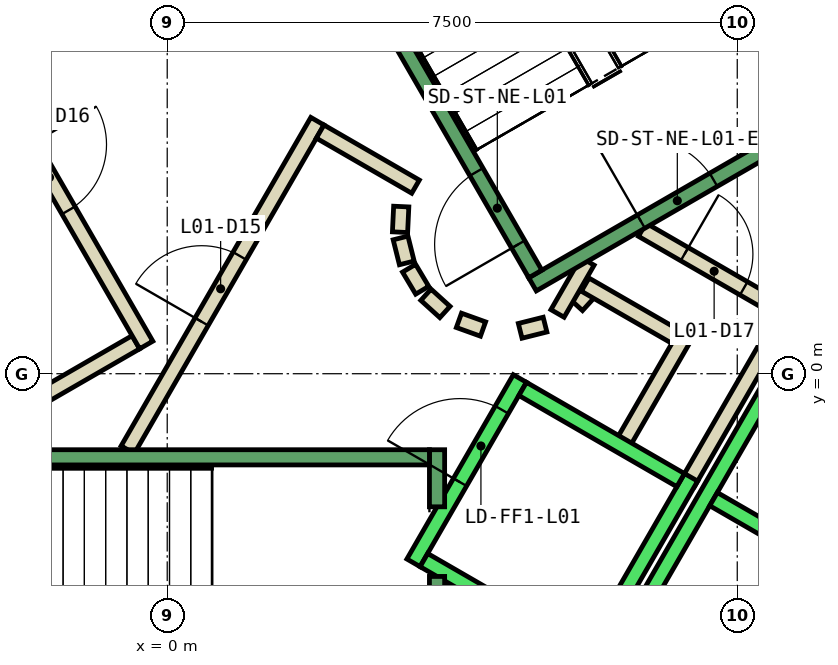
"""IFC4 building model, lengths in metres.
Left out: names, types, materials, properties, quantities, classifications, styles, units other than length and angle.
Written with IfcOpenShell. Run it as: python <this file> out.ifc"""

import sys

from ifc_helpers import new_model, si_unit, direction, frame, frame_2d, origin, place, context, subcontext, project, spatial, polyline, rectangle, outline, extrude, element, fill, save


model = new_model("IFC4")
c1 = context("Model", 3, precision=1e-05, world=origin(), true_north=direction((0.0, 1.0)))
c2 = subcontext(c1, "Body", "Model", "MODEL_VIEW")
j1 = project(units=[si_unit("LENGTHUNIT", "METRE"), si_unit("PLANEANGLEUNIT", "RADIAN")], contexts=[c1])
p1 = place(None, origin())
s1 = spatial("IfcSite", under=j1, at=p1, CompositionType="ELEMENT")
p2 = place(p1, origin())
s2 = spatial("IfcBuilding", under=s1, at=p2, CompositionType="ELEMENT")
p3 = place(p2, frame((0.0, 0.0, 9.0)))
s3 = spatial("IfcBuildingStorey", under=s2, at=p3, CompositionType="ELEMENT", Elevation=9.0)
p4 = place(p3, frame((0.0, 0.0, -0.45)))
e1 = element("IfcWall", 1, at=p4, inside=s3, PredefinedType="SHEAR", context=c2, shape_type="SweptSolid", body=[
    extrude(outline(polyline([(8.517, 11.748), (7.651, 11.248), (12.702, 2.5), (13.856, 2.5), (8.517, 11.748)])), origin(), (0.0, 0.0, 1.0), 6.0),
])
p5 = place(p3, frame((5.39, 0.898, 0.0), z_axis=(0.0, 0.0, 1.0), x_axis=(0.673828488714, 0.738887791073, 0.0)))
e2 = element("IfcWall", 2, at=p5, inside=s3, PredefinedType="PARTITIONING", context=c2, shape_type="SweptSolid", body=[
    extrude(rectangle(XDim=0.263, YDim=0.2, at=frame_2d((0.131, 0.0))), origin(), (0.0, 0.0, 1.0), 5.55),
])
p6 = place(p3, frame((5.499, 1.172, 0.0), z_axis=(0.0, 0.0, 1.0), x_axis=(0.866333505267, -0.499465972466, 0.0)))
e3 = element("IfcWall", 3, at=p6, inside=s3, PredefinedType="PARTITIONING", context=c2, shape_type="SweptSolid", body=[
    extrude(rectangle(XDim=1.374, YDim=0.2, at=frame_2d((0.687, 0.0))), origin(), (0.0, 0.0, 1.0), 5.55),
])
p7 = place(p3, frame((6.826, 0.522, 0.0), z_axis=(0.0, 0.0, 1.0), x_axis=(-0.500016722714, -0.866015748706, 0.0)))
e4 = element("IfcWall", 4, at=p7, inside=s3, PredefinedType="PARTITIONING", context=c2, shape_type="SweptSolid", body=[
    extrude(rectangle(XDim=1.7, YDim=0.2, at=frame_2d((0.85, 0.0))), origin(), (0.0, 0.0, 1.0), 5.55),
])
p8 = place(p3, frame((8.192, 0.888, 0.0), z_axis=(0.0, 0.0, 1.0), x_axis=(-0.499940625693, -0.866059680843, 0.0)))
e5 = element("IfcWall", 5, at=p8, inside=s3, PredefinedType="PARTITIONING", context=c2, shape_type="SweptSolid", body=[
    extrude(rectangle(XDim=2.68, YDim=0.2, at=frame_2d((1.34, 0.0))), origin(), (0.0, 0.0, 1.0), 5.55),
])
p9 = place(p3, frame((5.135, 0.793, 0.0), z_axis=(0.0, 0.0, 1.0), x_axis=(0.499526442893, 0.866298639529, 0.0)))
e6 = element("IfcWall", 6, at=p9, inside=s3, PredefinedType="PARTITIONING", context=c2, shape_type="SweptSolid", body=[
    extrude(rectangle(XDim=0.791, YDim=0.2, at=frame_2d((0.396, 0.0))), origin(), (0.0, 0.0, 1.0), 5.55),
])
p10 = place(p3, frame((6.25, 1.894, 0.0), z_axis=(0.0, 0.0, 1.0), x_axis=(0.866043184279, -0.499969202016, 0.0)))
e7 = element("IfcWall", 7, at=p10, inside=s3, PredefinedType="PARTITIONING", context=c2, shape_type="SweptSolid", body=[
    extrude(rectangle(XDim=2.084, YDim=0.2, at=frame_2d((1.042, 0.0))), origin(), (0.0, 0.0, 1.0), 5.55),
])
p11 = place(p10, frame((0.642, 0.0, 0.0)))
e8 = element("IfcOpeningElement", 8, at=p11, cuts=e7, PredefinedType="OPENING", context=c2, shape_type="SweptSolid", body=[
    extrude(rectangle(XDim=0.9, YDim=2.1, at=frame_2d((0.45, 1.05))), frame((0.0, 0.11, 0.0), z_axis=(0.0, -1.0, 0.0), x_axis=(1.0, 0.0, 0.0)), (0.0, 0.0, 1.0), 0.22),
])
p12 = place(p3, frame((3.079, 2.199, 0.0), z_axis=(0.0, 0.0, 1.0), x_axis=(-0.047771483479, -0.998858290933, 0.0)))
e9 = element("IfcWall", 9, at=p12, inside=s3, PredefinedType="PARTITIONING", context=c2, shape_type="SweptSolid", body=[
    extrude(rectangle(XDim=0.337, YDim=0.2, at=frame_2d((0.169, 0.0))), origin(), (0.0, 0.0, 1.0), 5.55),
])
p13 = place(p3, frame((3.07, 1.786, 0.0), z_axis=(0.0, 0.0, 1.0), x_axis=(0.242705583207, -0.970099994784, 0.0)))
e10 = element("IfcWall", 10, at=p13, inside=s3, PredefinedType="PARTITIONING", context=c2, shape_type="SweptSolid", body=[
    extrude(rectangle(XDim=0.338, YDim=0.2, at=frame_2d((0.169, 0.0))), origin(), (0.0, 0.0, 1.0), 5.55),
])
for number, where, z_axis, x_axis in (
    (11, (3.182, 1.388, 0.0), (0.0, 0.0, 1.0), (0.512, -0.859, 0.0)),
    (12, (3.404, 1.039, 0.0), (0.0, 0.0, 1.0), (0.74, -0.672, 0.0)),
):
    element("IfcWall", number, at=place(p3, frame(where, z_axis=z_axis, x_axis=x_axis)), inside=s3, PredefinedType="PARTITIONING", context=c2, shape_type="SweptSolid", body=[
        extrude(rectangle(XDim=0.338, YDim=0.2, at=frame_2d((0.169, 0.0))), origin(), (0.0, 0.0, 1.0), 5.55),
    ])
p14 = place(p3, frame((3.838, 0.702, 0.0), z_axis=(0.0, 0.0, 1.0), x_axis=(0.941035081519, -0.338308993895, 0.0)))
e13 = element("IfcWall", 13, at=p14, inside=s3, PredefinedType="PARTITIONING", context=c2, shape_type="SweptSolid", body=[
    extrude(rectangle(XDim=0.337, YDim=0.2, at=frame_2d((0.168, 0.0))), origin(), (0.0, 0.0, 1.0), 5.55),
])
p15 = place(p3, frame((4.644, 0.564, 0.0), z_axis=(0.0, 0.0, 1.0), x_axis=(0.969929076366, 0.243387729394, 0.0)))
e14 = element("IfcWall", 14, at=p15, inside=s3, PredefinedType="PARTITIONING", context=c2, shape_type="SweptSolid", body=[
    extrude(rectangle(XDim=0.337, YDim=0.2, at=frame_2d((0.168, 0.0))), origin(), (0.0, 0.0, 1.0), 5.55),
])
p16 = place(p3, frame((-0.52, -1.0, 0.0), z_axis=(0.0, 0.0, 1.0), x_axis=(0.50011622646, 0.865958290007, 0.0)))
e15 = element("IfcWall", 15, at=p16, inside=s3, PredefinedType="PARTITIONING", context=c2, shape_type="SweptSolid", body=[
    extrude(rectangle(XDim=4.991, YDim=0.2, at=frame_2d((2.496, 0.0))), origin(), (0.0, 0.0, 1.0), 5.55),
])
p17 = place(p16, frame((1.945, 0.0, 0.0)))
e16 = element("IfcOpeningElement", 16, at=p17, cuts=e15, PredefinedType="OPENING", context=c2, shape_type="SweptSolid", body=[
    extrude(rectangle(XDim=1.0, YDim=2.1, at=frame_2d((0.5, 1.05))), frame((0.0, 0.11, 0.0), z_axis=(0.0, -1.0, 0.0), x_axis=(1.0, 0.0, 0.0)), (0.0, 0.0, 1.0), 0.22),
])
p18 = place(p3, frame((2.012, 3.186, 0.0), z_axis=(0.0, 0.0, 1.0), x_axis=(0.865891012941, -0.500232699559, 0.0)))
e17 = element("IfcWall", 17, at=p18, inside=s3, PredefinedType="PARTITIONING", context=c2, shape_type="SweptSolid", body=[
    extrude(rectangle(XDim=1.449, YDim=0.2, at=frame_2d((0.725, 0.0))), origin(), (0.0, 0.0, 1.0), 5.55),
])
p19 = place(p3, frame((-0.412, 0.414, 0.0), z_axis=(0.0, 0.0, 1.0), x_axis=(-0.866017369001, -0.500013916395, 0.0)))
e18 = element("IfcWall", 18, at=p19, inside=s3, PredefinedType="PARTITIONING", context=c2, shape_type="SweptSolid", body=[
    extrude(rectangle(XDim=1.45, YDim=0.2, at=frame_2d((0.725, 0.0))), origin(), (0.0, 0.0, 1.0), 5.55),
])
p20 = place(p3, frame((-2.771, 4.7, 0.0), z_axis=(0.0, 0.0, 1.0), x_axis=(0.499969479948, -0.866043023828, 0.0)))
e19 = element("IfcWall", 19, at=p20, inside=s3, PredefinedType="PARTITIONING", context=c2, shape_type="SweptSolid", body=[
    extrude(rectangle(XDim=4.99, YDim=0.2, at=frame_2d((2.495, 0.0))), origin(), (0.0, 0.0, 1.0), 5.55),
])
p21 = place(p20, frame((1.945, 0.0, 0.0)))
e20 = element("IfcOpeningElement", 20, at=p21, cuts=e19, PredefinedType="OPENING", context=c2, shape_type="SweptSolid", body=[
    extrude(rectangle(XDim=1.0, YDim=2.1, at=frame_2d((0.5, 1.05))), frame((0.0, 0.11, 0.0), z_axis=(0.0, -1.0, 0.0), x_axis=(1.0, 0.0, 0.0)), (0.0, 0.0, 1.0), 0.22),
])
p22 = place(p3, frame((3.24, -2.488, 0.0), z_axis=(0.0, 0.0, 1.0), x_axis=(0.49994636267, 0.866056369097, 0.0)))
e21 = element("IfcWall", 21, at=p22, inside=s3, PredefinedType="STANDARD", context=c2, shape_type="SweptSolid", body=[
    extrude(rectangle(XDim=2.8, YDim=0.2, at=frame_2d((1.4, 0.0))), origin(), (0.0, 0.0, 1.0), 5.55),
])
p23 = place(p22, frame((1.225, 0.0, 0.0)))
e22 = element("IfcOpeningElement", 22, at=p23, cuts=e21, PredefinedType="OPENING", context=c2, shape_type="SweptSolid", body=[
    extrude(rectangle(XDim=1.1, YDim=2.1, at=frame_2d((0.55, 1.05))), frame((0.0, 0.11, 0.0), z_axis=(0.0, -1.0, 0.0), x_axis=(1.0, 0.0, 0.0)), (0.0, 0.0, 1.0), 0.22),
])
p24 = place(p3, frame((5.492, -3.788, 0.0), z_axis=(0.0, 0.0, 1.0), x_axis=(0.500011755427, 0.866018616679, 0.0)))
e23 = element("IfcWall", 23, at=p24, inside=s3, PredefinedType="STANDARD", context=c2, shape_type="SweptSolid", body=[
    extrude(rectangle(XDim=2.8, YDim=0.2, at=frame_2d((1.4, 0.0))), origin(), (0.0, 0.0, 1.0), 5.55),
])
p25 = place(p3, frame((3.377, -2.452, 0.0), z_axis=(0.0, 0.0, 1.0), x_axis=(0.865955154139, -0.50012165622, 0.0)))
e24 = element("IfcWall", 24, at=p25, inside=s3, PredefinedType="STANDARD", context=c2, shape_type="SweptSolid", body=[
    extrude(rectangle(XDim=2.4, YDim=0.2, at=frame_2d((1.2, 0.0))), origin(), (0.0, 0.0, 1.0), 5.55),
])
p26 = place(p3, frame((4.677, -0.2, 0.0), z_axis=(0.0, 0.0, 1.0), x_axis=(0.865973769406, -0.500089422704, 0.0)))
e25 = element("IfcWall", 25, at=p26, inside=s3, PredefinedType="STANDARD", context=c2, shape_type="SweptSolid", body=[
    extrude(rectangle(XDim=2.399, YDim=0.2, at=frame_2d((1.2, 0.0))), origin(), (0.0, 0.0, 1.0), 5.55),
])
p27 = place(p3, frame((4.451, -6.19, 0.0), z_axis=(0.0, 0.0, 1.0), x_axis=(0.50000090737, 0.866024879913, 0.0)))
e26 = element("IfcWall", 26, at=p27, inside=s3, PredefinedType="STANDARD", context=c2, shape_type="SweptSolid", body=[
    extrude(rectangle(XDim=10.6, YDim=0.2, at=frame_2d((5.3, 0.0))), origin(), (0.0, 0.0, 1.0), 5.55),
])
p28 = place(p3, frame((7.188, -1.65, 0.0), z_axis=(0.0, 0.0, 1.0), x_axis=(0.866022959057, -0.500004234368, 0.0)))
e27 = element("IfcWall", 27, at=p28, inside=s3, PredefinedType="STANDARD", context=c2, shape_type="SweptSolid", body=[
    extrude(rectangle(XDim=2.5, YDim=0.2, at=frame_2d((1.25, 0.0))), origin(), (0.0, 0.0, 1.0), 5.55),
])
p29 = place(p3, frame((3.55, -2.667, 0.0), z_axis=(0.0, 0.0, 1.0), x_axis=(0.0, -1.0, 0.0)))
e28 = element("IfcWall", 28, at=p29, inside=s3, PredefinedType="STANDARD", context=c2, shape_type="SweptSolid", body=[
    extrude(rectangle(XDim=2.733, YDim=0.2, at=frame_2d((1.366, 0.0))), origin(), (0.0, 0.0, 1.0), 5.55),
])
p30 = place(p3, frame((3.55, -1.0, 0.0), z_axis=(0.0, 0.0, 1.0), x_axis=(0.0, -1.0, 0.0)))
e29 = element("IfcWall", 29, at=p30, inside=s3, PredefinedType="STANDARD", context=c2, shape_type="SweptSolid", body=[
    extrude(rectangle(XDim=0.751, YDim=0.2, at=frame_2d((0.375, 0.0))), origin(), (0.0, 0.0, 1.0), 5.55),
])
p31 = place(p3, frame((-3.45, -1.1, 0.0), z_axis=(0.0, 0.0, 1.0), x_axis=(1.0, 0.0, 0.0)))
e30 = element("IfcWall", 30, at=p31, inside=s3, PredefinedType="STANDARD", context=c2, shape_type="SweptSolid", body=[
    extrude(rectangle(XDim=6.9, YDim=0.2, at=frame_2d((3.45, 0.0))), origin(), (0.0, 0.0, 1.0), 5.55),
])
p32 = place(p31, frame((0.45, 0.0, 0.0)))
e31 = element("IfcOpeningElement", 31, at=p32, cuts=e30, PredefinedType="OPENING", context=c2, shape_type="SweptSolid", body=[
    extrude(rectangle(XDim=1.1, YDim=2.2, at=frame_2d((0.55, 1.1))), frame((0.0, 0.11, 0.0), z_axis=(0.0, -1.0, 0.0), x_axis=(1.0, 0.0, 0.0)), (0.0, 0.0, 1.0), 0.22),
])
p33 = place(p3, frame((4.806, 1.176, 0.0), z_axis=(0.0, 0.0, 1.0), x_axis=(0.866059941101, 0.499940174841, 0.0)))
e32 = element("IfcWall", 32, at=p33, inside=s3, PredefinedType="STANDARD", context=c2, shape_type="SweptSolid", body=[
    extrude(rectangle(XDim=4.4, YDim=0.2, at=frame_2d((2.2, 0.0))), origin(), (0.0, 0.0, 1.0), 5.55),
])
p34 = place(p33, frame((1.65, 0.0, 0.0)))
e33 = element("IfcOpeningElement", 33, at=p34, cuts=e32, PredefinedType="OPENING", context=c2, shape_type="SweptSolid", body=[
    extrude(rectangle(XDim=1.1, YDim=2.2, at=frame_2d((0.55, 1.1))), frame((0.0, 0.11, 0.0), z_axis=(0.0, -1.0, 0.0), x_axis=(1.0, 0.0, 0.0)), (0.0, 0.0, 1.0), 0.22),
])
p35 = place(p3, frame((4.843, 1.312, 0.0), z_axis=(0.0, 0.0, 1.0), x_axis=(-0.499963383562, 0.866046543262, 0.0)))
e34 = element("IfcWall", 34, at=p35, inside=s3, PredefinedType="STANDARD", context=c2, shape_type="SweptSolid", body=[
    extrude(rectangle(XDim=6.9, YDim=0.2, at=frame_2d((3.45, 0.0))), origin(), (0.0, 0.0, 1.0), 5.55),
])
p36 = place(p35, frame((0.45, 0.0, 0.0)))
e35 = element("IfcOpeningElement", 35, at=p36, cuts=e34, PredefinedType="OPENING", context=c2, shape_type="SweptSolid", body=[
    extrude(rectangle(XDim=1.1, YDim=2.2, at=frame_2d((0.55, 1.1))), frame((0.0, 0.11, 0.0), z_axis=(0.0, -1.0, 0.0), x_axis=(1.0, 0.0, 0.0)), (0.0, 0.0, 1.0), 0.22),
])
p37 = place(p3, frame((8.48, 3.412, 0.0), z_axis=(0.0, 0.0, 1.0), x_axis=(-0.499978703459, 0.866037698999, 0.0)))
e36 = element("IfcWall", 36, at=p37, inside=s3, PredefinedType="STANDARD", context=c2, shape_type="SweptSolid", body=[
    extrude(rectangle(XDim=6.9, YDim=0.2, at=frame_2d((3.45, 0.0))), origin(), (0.0, 0.0, 1.0), 5.55),
])
p38 = place(p3, frame((-1.393, 7.288, 0.0), z_axis=(0.0, 0.0, 1.0), x_axis=(-0.499963383562, -0.866046543262, 0.0)))
e37 = element("IfcWall", 37, at=p38, inside=s3, PredefinedType="STANDARD", context=c2, shape_type="SweptSolid", body=[
    extrude(rectangle(XDim=6.9, YDim=0.2, at=frame_2d((3.45, 0.0))), origin(), (0.0, 0.0, 1.0), 5.55),
])
p39 = place(p38, frame((0.45, 0.0, 0.0)))
e38 = element("IfcOpeningElement", 38, at=p39, cuts=e37, PredefinedType="OPENING", context=c2, shape_type="SweptSolid", body=[
    extrude(rectangle(XDim=1.1, YDim=2.2, at=frame_2d((0.55, 1.1))), frame((0.0, 0.11, 0.0), z_axis=(0.0, -1.0, 0.0), x_axis=(1.0, 0.0, 0.0)), (0.0, 0.0, 1.0), 0.22),
])
p40 = place(p17, origin())
e39 = element("IfcDoor", 39, at=p40, inside=s3, OperationType="SINGLE_SWING_LEFT", PredefinedType="DOOR", context=c2, shape_type="SweptSolid", body=[
    extrude(rectangle(XDim=1.0, YDim=2.1, at=frame_2d((0.5, 1.05))), frame((0.0, 0.025, 0.0), z_axis=(0.0, -1.0, 0.0), x_axis=(1.0, 0.0, 0.0)), (0.0, 0.0, 1.0), 0.05),
])
fill(e16, e39)
p41 = place(p21, origin())
e40 = element("IfcDoor", 40, at=p41, inside=s3, OperationType="SINGLE_SWING_RIGHT", PredefinedType="DOOR", context=c2, shape_type="SweptSolid", body=[
    extrude(rectangle(XDim=1.0, YDim=2.1, at=frame_2d((0.5, 1.05))), frame((0.0, 0.025, 0.0), z_axis=(0.0, -1.0, 0.0), x_axis=(1.0, 0.0, 0.0)), (0.0, 0.0, 1.0), 0.05),
])
fill(e20, e40)
p42 = place(p11, origin())
e41 = element("IfcDoor", 41, at=p42, inside=s3, OperationType="SINGLE_SWING_LEFT", PredefinedType="DOOR", context=c2, shape_type="SweptSolid", body=[
    extrude(rectangle(XDim=0.9, YDim=2.1, at=frame_2d((0.45, 1.05))), frame((0.0, 0.025, 0.0), z_axis=(0.0, -1.0, 0.0), x_axis=(1.0, 0.0, 0.0)), (0.0, 0.0, 1.0), 0.05),
])
fill(e8, e41)
p43 = place(p23, origin())
e42 = element("IfcDoor", 42, at=p43, inside=s3, OperationType="SLIDING_TO_LEFT", PredefinedType="DOOR", context=c2, shape_type="SweptSolid", body=[
    extrude(rectangle(XDim=1.1, YDim=2.1, at=frame_2d((0.55, 1.05))), frame((0.0, 0.025, 0.0), z_axis=(0.0, -1.0, 0.0), x_axis=(1.0, 0.0, 0.0)), (0.0, 0.0, 1.0), 0.05),
])
fill(e22, e42)
p44 = place(p36, origin())
e43 = element("IfcDoor", 43, at=p44, inside=s3, OperationType="SINGLE_SWING_LEFT", PredefinedType="DOOR", context=c2, shape_type="SweptSolid", body=[
    extrude(rectangle(XDim=1.1, YDim=2.2, at=frame_2d((0.55, 1.1))), frame((0.0, 0.025, 0.0), z_axis=(0.0, -1.0, 0.0), x_axis=(1.0, 0.0, 0.0)), (0.0, 0.0, 1.0), 0.05),
])
fill(e35, e43)
p45 = place(p34, origin())
e44 = element("IfcDoor", 44, at=p45, inside=s3, OperationType="SINGLE_SWING_LEFT", PredefinedType="DOOR", context=c2, shape_type="SweptSolid", body=[
    extrude(rectangle(XDim=1.1, YDim=2.2, at=frame_2d((0.55, 1.1))), frame((0.0, 0.025, 0.0), z_axis=(0.0, -1.0, 0.0), x_axis=(1.0, 0.0, 0.0)), (0.0, 0.0, 1.0), 0.05),
])
fill(e33, e44)
save(model, sys.argv[1])
